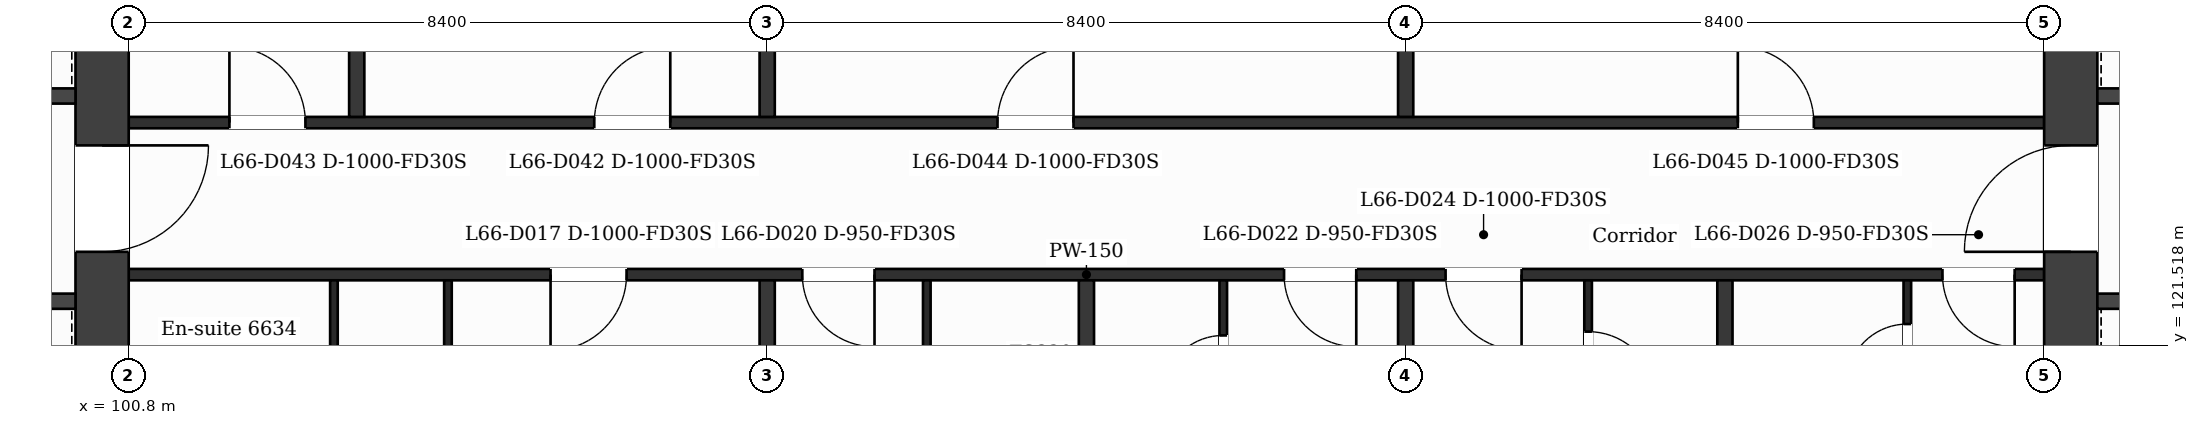
"""IFC4 building model, lengths in metres.
Left out: names, types, materials, properties, quantities, classifications, styles, units other than length and angle.
Written with IfcOpenShell. Run it as: python <this file> out.ifc"""

import sys

from ifc_helpers import new_model, si_unit, direction, frame, frame_2d, origin, place, context, subcontext, project, spatial, rectangle, extrude, element, fill, save


model = new_model("IFC4")
c1 = context("Model", 3, precision=1e-05, world=origin(), true_north=direction((0.0, 1.0)))
c2 = subcontext(c1, "Body", "Model", "MODEL_VIEW")
j1 = project(units=[si_unit("LENGTHUNIT", "METRE"), si_unit("PLANEANGLEUNIT", "RADIAN")], contexts=[c1])
p1 = place(None, origin())
s1 = spatial("IfcSite", under=j1, at=p1, CompositionType="ELEMENT")
p2 = place(p1, origin())
s2 = spatial("IfcBuilding", under=s1, at=p2, CompositionType="ELEMENT")
p3 = place(p2, frame((0.0, 0.0, 273.8)))
s3 = spatial("IfcBuildingStorey", under=s2, at=p3, CompositionType="ELEMENT", Elevation=273.8)
p4 = place(p3, frame((100.45, 132.05, 0.0), z_axis=(0.0, 0.0, 1.0), x_axis=(0.0, -1.0, 0.0)))
e1 = element("IfcWall", 1, at=p4, inside=s3, PredefinedType="SHEAR", context=c2, shape_type="SweptSolid", body=[
    extrude(rectangle(XDim=21.3, YDim=0.7, at=frame_2d((10.65, 0.0))), origin(), (0.0, 0.0, 1.0), 3.7),
])
p5 = place(p4, frame((7.9, 0.0, 0.0)))
e2 = element("IfcOpeningElement", 2, at=p5, cuts=e1, PredefinedType="OPENING", context=c2, shape_type="SweptSolid", body=[
    extrude(rectangle(XDim=1.4, YDim=2.1, at=frame_2d((0.7, 1.05))), frame((0.0, 0.36, 0.0), z_axis=(0.0, -1.0, 0.0), x_axis=(1.0, 0.0, 0.0)), (0.0, 0.0, 1.0), 0.72),
])
p6 = place(p3, frame((126.35, 110.75, 0.0), z_axis=(0.0, 0.0, 1.0), x_axis=(0.0, 1.0, 0.0)))
e3 = element("IfcWall", 3, at=p6, inside=s3, PredefinedType="SHEAR", context=c2, shape_type="SweptSolid", body=[
    extrude(rectangle(XDim=21.3, YDim=0.7, at=frame_2d((10.65, 0.0))), origin(), (0.0, 0.0, 1.0), 3.7),
])
p7 = place(p6, frame((12.0, 0.0, 0.0)))
e4 = element("IfcOpeningElement", 4, at=p7, cuts=e3, PredefinedType="OPENING", context=c2, shape_type="SweptSolid", body=[
    extrude(rectangle(XDim=1.4, YDim=2.1, at=frame_2d((0.7, 1.05))), frame((0.0, 0.36, 0.0), z_axis=(0.0, -1.0, 0.0), x_axis=(1.0, 0.0, 0.0)), (0.0, 0.0, 1.0), 0.72),
])
p8 = place(p3, frame((95.227, 122.1, 0.0), z_axis=(0.0, 0.0, 1.0), x_axis=(1.0, 0.0, 0.0)))
e5 = element("IfcWall", 5, at=p8, inside=s3, PredefinedType="PARTITIONING", context=c2, shape_type="SweptSolid", body=[
    extrude(rectangle(XDim=4.873, YDim=0.2, at=frame_2d((2.437, 0.0))), origin(), (0.0, 0.0, 1.0), 3.38),
])
p9 = place(p8, frame((0.605, 0.0, 0.0)))
e6 = element("IfcOpeningElement", 6, at=p9, cuts=e5, PredefinedType="OPENING", context=c2, shape_type="SweptSolid", body=[
    extrude(rectangle(XDim=1.1, YDim=2.1, at=frame_2d((0.55, 1.05))), frame((0.0, 0.11, 0.0), z_axis=(0.0, -1.0, 0.0), x_axis=(1.0, 0.0, 0.0)), (0.0, 0.0, 1.0), 0.22),
])
p10 = place(p8, frame((2.946, 0.0, 0.0)))
e7 = element("IfcOpeningElement", 7, at=p10, cuts=e5, PredefinedType="OPENING", context=c2, shape_type="SweptSolid", body=[
    extrude(rectangle(XDim=1.1, YDim=2.1, at=frame_2d((0.55, 1.05))), frame((0.0, 0.11, 0.0), z_axis=(0.0, -1.0, 0.0), x_axis=(1.0, 0.0, 0.0)), (0.0, 0.0, 1.0), 0.22),
])
p11 = place(p3, frame((126.7, 122.1, 0.0), z_axis=(0.0, 0.0, 1.0), x_axis=(1.0, 0.0, 0.0)))
e8 = element("IfcWall", 8, at=p11, inside=s3, PredefinedType="PARTITIONING", context=c2, shape_type="SweptSolid", body=[
    extrude(rectangle(XDim=4.873, YDim=0.2, at=frame_2d((2.437, 0.0))), origin(), (0.0, 0.0, 1.0), 3.38),
])
p12 = place(p11, frame((3.105, 0.0, 0.0)))
e9 = element("IfcOpeningElement", 9, at=p12, cuts=e8, PredefinedType="OPENING", context=c2, shape_type="SweptSolid", body=[
    extrude(rectangle(XDim=1.1, YDim=2.1, at=frame_2d((0.55, 1.05))), frame((0.0, 0.11, 0.0), z_axis=(0.0, -1.0, 0.0), x_axis=(1.0, 0.0, 0.0)), (0.0, 0.0, 1.0), 0.22),
])
p13 = place(p11, frame((0.668, 0.0, 0.0)))
e10 = element("IfcOpeningElement", 10, at=p13, cuts=e8, PredefinedType="OPENING", context=c2, shape_type="SweptSolid", body=[
    extrude(rectangle(XDim=1.1, YDim=2.1, at=frame_2d((0.55, 1.05))), frame((0.0, 0.11, 0.0), z_axis=(0.0, -1.0, 0.0), x_axis=(1.0, 0.0, 0.0)), (0.0, 0.0, 1.0), 0.22),
])
p14 = place(p3, frame((100.8, 122.45, 0.0), z_axis=(0.0, 0.0, 1.0), x_axis=(1.0, 0.0, 0.0)))
e11 = element("IfcWall", 11, at=p14, inside=s3, PredefinedType="PARTITIONING", context=c2, shape_type="SweptSolid", body=[
    extrude(rectangle(XDim=25.2, YDim=0.15, at=frame_2d((12.6, 0.0))), origin(), (0.0, 0.0, 1.0), 3.38),
])
p15 = place(p14, frame((5.55, 0.0, 0.0)))
e12 = element("IfcOpeningElement", 12, at=p15, cuts=e11, PredefinedType="OPENING", context=c2, shape_type="SweptSolid", body=[
    extrude(rectangle(XDim=1.0, YDim=2.1, at=frame_2d((0.5, 1.05))), frame((0.0, 0.085, 0.0), z_axis=(0.0, -1.0, 0.0), x_axis=(1.0, 0.0, 0.0)), (0.0, 0.0, 1.0), 0.17),
])
p16 = place(p14, frame((8.862, 0.0, 0.0)))
e13 = element("IfcOpeningElement", 13, at=p16, cuts=e11, PredefinedType="OPENING", context=c2, shape_type="SweptSolid", body=[
    extrude(rectangle(XDim=0.95, YDim=2.1, at=frame_2d((0.475, 1.05))), frame((0.0, 0.085, 0.0), z_axis=(0.0, -1.0, 0.0), x_axis=(1.0, 0.0, 0.0)), (0.0, 0.0, 1.0), 0.17),
])
p17 = place(p14, frame((15.2, 0.0, 0.0)))
e14 = element("IfcOpeningElement", 14, at=p17, cuts=e11, PredefinedType="OPENING", context=c2, shape_type="SweptSolid", body=[
    extrude(rectangle(XDim=0.95, YDim=2.1, at=frame_2d((0.475, 1.05))), frame((0.0, 0.085, 0.0), z_axis=(0.0, -1.0, 0.0), x_axis=(1.0, 0.0, 0.0)), (0.0, 0.0, 1.0), 0.17),
])
p18 = place(p14, frame((17.325, 0.0, 0.0)))
e15 = element("IfcOpeningElement", 15, at=p18, cuts=e11, PredefinedType="OPENING", context=c2, shape_type="SweptSolid", body=[
    extrude(rectangle(XDim=1.0, YDim=2.1, at=frame_2d((0.5, 1.05))), frame((0.0, 0.085, 0.0), z_axis=(0.0, -1.0, 0.0), x_axis=(1.0, 0.0, 0.0)), (0.0, 0.0, 1.0), 0.17),
])
p19 = place(p14, frame((23.862, 0.0, 0.0)))
e16 = element("IfcOpeningElement", 16, at=p19, cuts=e11, PredefinedType="OPENING", context=c2, shape_type="SweptSolid", body=[
    extrude(rectangle(XDim=0.95, YDim=2.1, at=frame_2d((0.475, 1.05))), frame((0.0, 0.085, 0.0), z_axis=(0.0, -1.0, 0.0), x_axis=(1.0, 0.0, 0.0)), (0.0, 0.0, 1.0), 0.17),
])
p20 = place(p3, frame((100.8, 124.45, 0.0), z_axis=(0.0, 0.0, 1.0), x_axis=(1.0, 0.0, 0.0)))
e17 = element("IfcWall", 17, at=p20, inside=s3, PredefinedType="PARTITIONING", context=c2, shape_type="SweptSolid", body=[
    extrude(rectangle(XDim=25.2, YDim=0.15, at=frame_2d((12.6, 0.0))), origin(), (0.0, 0.0, 1.0), 3.38),
])
p21 = place(p20, frame((6.125, 0.0, 0.0)))
e18 = element("IfcOpeningElement", 18, at=p21, cuts=e17, PredefinedType="OPENING", context=c2, shape_type="SweptSolid", body=[
    extrude(rectangle(XDim=1.0, YDim=2.1, at=frame_2d((0.5, 1.05))), frame((0.0, 0.085, 0.0), z_axis=(0.0, -1.0, 0.0), x_axis=(1.0, 0.0, 0.0)), (0.0, 0.0, 1.0), 0.17),
])
p22 = place(p20, frame((1.325, 0.0, 0.0)))
e19 = element("IfcOpeningElement", 19, at=p22, cuts=e17, PredefinedType="OPENING", context=c2, shape_type="SweptSolid", body=[
    extrude(rectangle(XDim=1.0, YDim=2.1, at=frame_2d((0.5, 1.05))), frame((0.0, 0.085, 0.0), z_axis=(0.0, -1.0, 0.0), x_axis=(1.0, 0.0, 0.0)), (0.0, 0.0, 1.0), 0.17),
])
p23 = place(p20, frame((11.43, 0.0, 0.0)))
e20 = element("IfcOpeningElement", 20, at=p23, cuts=e17, PredefinedType="OPENING", context=c2, shape_type="SweptSolid", body=[
    extrude(rectangle(XDim=1.0, YDim=2.1, at=frame_2d((0.5, 1.05))), frame((0.0, 0.085, 0.0), z_axis=(0.0, -1.0, 0.0), x_axis=(1.0, 0.0, 0.0)), (0.0, 0.0, 1.0), 0.17),
])
p24 = place(p20, frame((21.17, 0.0, 0.0)))
e21 = element("IfcOpeningElement", 21, at=p24, cuts=e17, PredefinedType="OPENING", context=c2, shape_type="SweptSolid", body=[
    extrude(rectangle(XDim=1.0, YDim=2.1, at=frame_2d((0.5, 1.05))), frame((0.0, 0.085, 0.0), z_axis=(0.0, -1.0, 0.0), x_axis=(1.0, 0.0, 0.0)), (0.0, 0.0, 1.0), 0.17),
])
p25 = place(p3, frame((92.702, 124.8, 0.0), z_axis=(0.0, 0.0, 1.0), x_axis=(1.0, 0.0, 0.0)))
e22 = element("IfcWall", 22, at=p25, inside=s3, PredefinedType="PARTITIONING", context=c2, shape_type="SweptSolid", body=[
    extrude(rectangle(XDim=7.398, YDim=0.2, at=frame_2d((3.699, 0.0))), origin(), (0.0, 0.0, 1.0), 3.38),
])
p26 = place(p25, frame((5.636, 0.0, 0.0)))
e23 = element("IfcOpeningElement", 23, at=p26, cuts=e22, PredefinedType="OPENING", context=c2, shape_type="SweptSolid", body=[
    extrude(rectangle(XDim=1.1, YDim=2.1, at=frame_2d((0.55, 1.05))), frame((0.0, 0.11, 0.0), z_axis=(0.0, -1.0, 0.0), x_axis=(1.0, 0.0, 0.0)), (0.0, 0.0, 1.0), 0.22),
])
p27 = place(p3, frame((126.7, 124.8, 0.0), z_axis=(0.0, 0.0, 1.0), x_axis=(1.0, 0.0, 0.0)))
e24 = element("IfcWall", 24, at=p27, inside=s3, PredefinedType="PARTITIONING", context=c2, shape_type="SweptSolid", body=[
    extrude(rectangle(XDim=4.849, YDim=0.2, at=frame_2d((2.424, 0.0))), origin(), (0.0, 0.0, 1.0), 3.38),
])
p28 = place(p27, frame((0.818, 0.0, 0.0)))
e25 = element("IfcOpeningElement", 25, at=p28, cuts=e24, PredefinedType="OPENING", context=c2, shape_type="SweptSolid", body=[
    extrude(rectangle(XDim=1.1, YDim=2.1, at=frame_2d((0.55, 1.05))), frame((0.0, 0.11, 0.0), z_axis=(0.0, -1.0, 0.0), x_axis=(1.0, 0.0, 0.0)), (0.0, 0.0, 1.0), 0.22),
])
p29 = place(p3, frame((103.5, 120.4, 0.0), z_axis=(0.0, 0.0, 1.0), x_axis=(0.0, 1.0, 0.0)))
e26 = element("IfcWall", 26, at=p29, inside=s3, PredefinedType="PARTITIONING", context=c2, shape_type="SweptSolid", body=[
    extrude(rectangle(XDim=1.975, YDim=0.1, at=frame_2d((0.988, 0.0))), origin(), (0.0, 0.0, 1.0), 3.38),
])
p30 = place(p3, frame((103.8, 124.525, 0.0), z_axis=(0.0, 0.0, 1.0), x_axis=(0.0, 1.0, 0.0)))
e27 = element("IfcWall", 27, at=p30, inside=s3, PredefinedType="PARTITIONING", context=c2, shape_type="SweptSolid", body=[
    extrude(rectangle(XDim=5.825, YDim=0.2, at=frame_2d((2.913, 0.0))), origin(), (0.0, 0.0, 1.0), 3.38),
])
p31 = place(p3, frame((105.0, 110.55, 0.0), z_axis=(0.0, 0.0, 1.0), x_axis=(0.0, 1.0, 0.0)))
e28 = element("IfcWall", 28, at=p31, inside=s3, PredefinedType="PARTITIONING", context=c2, shape_type="SweptSolid", body=[
    extrude(rectangle(XDim=11.825, YDim=0.1, at=frame_2d((5.913, 0.0))), origin(), (0.0, 0.0, 1.0), 3.38),
])
p32 = place(p31, frame((9.09, 0.0, 0.0)))
e29 = element("IfcOpeningElement", 29, at=p32, cuts=e28, PredefinedType="OPENING", context=c2, shape_type="SweptSolid", body=[
    extrude(rectangle(XDim=0.9, YDim=2.1, at=frame_2d((0.45, 1.05))), frame((0.0, 0.06, 0.0), z_axis=(0.0, -1.0, 0.0), x_axis=(1.0, 0.0, 0.0)), (0.0, 0.0, 1.0), 0.12),
])
p33 = place(p3, frame((109.2, 110.55, 0.0), z_axis=(0.0, 0.0, 1.0), x_axis=(0.0, 1.0, 0.0)))
e30 = element("IfcWall", 30, at=p33, inside=s3, PredefinedType="PARTITIONING", context=c2, shape_type="SweptSolid", body=[
    extrude(rectangle(XDim=11.825, YDim=0.2, at=frame_2d((5.913, 0.0))), origin(), (0.0, 0.0, 1.0), 3.38),
])
p34 = place(p3, frame((109.2, 124.525, 0.0), z_axis=(0.0, 0.0, 1.0), x_axis=(0.0, 1.0, 0.0)))
e31 = element("IfcWall", 31, at=p34, inside=s3, PredefinedType="PARTITIONING", context=c2, shape_type="SweptSolid", body=[
    extrude(rectangle(XDim=9.2, YDim=0.2, at=frame_2d((4.6, 0.0))), origin(), (0.0, 0.0, 1.0), 3.38),
])
p35 = place(p3, frame((111.3, 119.8, 0.0), z_axis=(0.0, 0.0, 1.0), x_axis=(0.0, 1.0, 0.0)))
e32 = element("IfcWall", 32, at=p35, inside=s3, PredefinedType="PARTITIONING", context=c2, shape_type="SweptSolid", body=[
    extrude(rectangle(XDim=2.575, YDim=0.1, at=frame_2d((1.288, 0.0))), origin(), (0.0, 0.0, 1.0), 3.38),
])
p36 = place(p35, frame((0.6, 0.0, 0.0)))
e33 = element("IfcOpeningElement", 33, at=p36, cuts=e32, PredefinedType="OPENING", context=c2, shape_type="SweptSolid", body=[
    extrude(rectangle(XDim=0.8, YDim=2.1, at=frame_2d((0.4, 1.05))), frame((0.0, 0.06, 0.0), z_axis=(0.0, -1.0, 0.0), x_axis=(1.0, 0.0, 0.0)), (0.0, 0.0, 1.0), 0.12),
])
p37 = place(p3, frame((113.4, 110.55, 0.0), z_axis=(0.0, 0.0, 1.0), x_axis=(0.0, 1.0, 0.0)))
e34 = element("IfcWall", 34, at=p37, inside=s3, PredefinedType="PARTITIONING", context=c2, shape_type="SweptSolid", body=[
    extrude(rectangle(XDim=11.825, YDim=0.2, at=frame_2d((5.913, 0.0))), origin(), (0.0, 0.0, 1.0), 3.38),
])
p38 = place(p3, frame((115.2, 120.1, 0.0), z_axis=(0.0, 0.0, 1.0), x_axis=(0.0, 1.0, 0.0)))
e35 = element("IfcWall", 35, at=p38, inside=s3, PredefinedType="PARTITIONING", context=c2, shape_type="SweptSolid", body=[
    extrude(rectangle(XDim=2.275, YDim=0.1, at=frame_2d((1.137, 0.0))), origin(), (0.0, 0.0, 1.0), 3.38),
])
p39 = place(p38, frame((0.75, 0.0, 0.0)))
e36 = element("IfcOpeningElement", 36, at=p39, cuts=e35, PredefinedType="OPENING", context=c2, shape_type="SweptSolid", body=[
    extrude(rectangle(XDim=0.8, YDim=2.1, at=frame_2d((0.4, 1.05))), frame((0.0, 0.06, 0.0), z_axis=(0.0, -1.0, 0.0), x_axis=(1.0, 0.0, 0.0)), (0.0, 0.0, 1.0), 0.12),
])
p40 = place(p3, frame((117.6, 110.55, 0.0), z_axis=(0.0, 0.0, 1.0), x_axis=(0.0, 1.0, 0.0)))
e37 = element("IfcWall", 37, at=p40, inside=s3, PredefinedType="PARTITIONING", context=c2, shape_type="SweptSolid", body=[
    extrude(rectangle(XDim=11.825, YDim=0.2, at=frame_2d((5.913, 0.0))), origin(), (0.0, 0.0, 1.0), 3.38),
])
p41 = place(p3, frame((117.6, 124.525, 0.0), z_axis=(0.0, 0.0, 1.0), x_axis=(0.0, 1.0, 0.0)))
e38 = element("IfcWall", 38, at=p41, inside=s3, PredefinedType="PARTITIONING", context=c2, shape_type="SweptSolid", body=[
    extrude(rectangle(XDim=9.2, YDim=0.2, at=frame_2d((4.6, 0.0))), origin(), (0.0, 0.0, 1.0), 3.38),
])
p42 = place(p3, frame((120.0, 120.1, 0.0), z_axis=(0.0, 0.0, 1.0), x_axis=(0.0, 1.0, 0.0)))
e39 = element("IfcWall", 39, at=p42, inside=s3, PredefinedType="PARTITIONING", context=c2, shape_type="SweptSolid", body=[
    extrude(rectangle(XDim=2.275, YDim=0.1, at=frame_2d((1.137, 0.0))), origin(), (0.0, 0.0, 1.0), 3.38),
])
p43 = place(p42, frame((0.7, 0.0, 0.0)))
e40 = element("IfcOpeningElement", 40, at=p43, cuts=e39, PredefinedType="OPENING", context=c2, shape_type="SweptSolid", body=[
    extrude(rectangle(XDim=0.9, YDim=2.1, at=frame_2d((0.45, 1.05))), frame((0.0, 0.06, 0.0), z_axis=(0.0, -1.0, 0.0), x_axis=(1.0, 0.0, 0.0)), (0.0, 0.0, 1.0), 0.12),
])
p44 = place(p3, frame((121.8, 110.55, 0.0), z_axis=(0.0, 0.0, 1.0), x_axis=(0.0, 1.0, 0.0)))
e41 = element("IfcWall", 41, at=p44, inside=s3, PredefinedType="PARTITIONING", context=c2, shape_type="SweptSolid", body=[
    extrude(rectangle(XDim=11.825, YDim=0.2, at=frame_2d((5.913, 0.0))), origin(), (0.0, 0.0, 1.0), 3.38),
])
p45 = place(p3, frame((124.2, 119.8, 0.0), z_axis=(0.0, 0.0, 1.0), x_axis=(0.0, 1.0, 0.0)))
e42 = element("IfcWall", 42, at=p45, inside=s3, PredefinedType="PARTITIONING", context=c2, shape_type="SweptSolid", body=[
    extrude(rectangle(XDim=2.575, YDim=0.1, at=frame_2d((1.288, 0.0))), origin(), (0.0, 0.0, 1.0), 3.38),
])
p46 = place(p45, frame((1.2, 0.0, 0.0)))
e43 = element("IfcOpeningElement", 43, at=p46, cuts=e42, PredefinedType="OPENING", context=c2, shape_type="SweptSolid", body=[
    extrude(rectangle(XDim=0.8, YDim=2.1, at=frame_2d((0.4, 1.05))), frame((0.0, 0.06, 0.0), z_axis=(0.0, -1.0, 0.0), x_axis=(1.0, 0.0, 0.0)), (0.0, 0.0, 1.0), 0.12),
])
p47 = place(p15, origin())
e44 = element("IfcDoor", 44, at=p47, inside=s3, OperationType="SINGLE_SWING_LEFT", PredefinedType="DOOR", context=c2, shape_type="SweptSolid", body=[
    extrude(rectangle(XDim=1.0, YDim=2.1, at=frame_2d((0.5, 1.05))), frame((0.0, 0.025, 0.0), z_axis=(0.0, -1.0, 0.0), x_axis=(1.0, 0.0, 0.0)), (0.0, 0.0, 1.0), 0.05),
])
fill(e12, e44)
p48 = place(p16, origin())
e45 = element("IfcDoor", 45, at=p48, inside=s3, OperationType="SINGLE_SWING_RIGHT", PredefinedType="DOOR", context=c2, shape_type="SweptSolid", body=[
    extrude(rectangle(XDim=0.95, YDim=2.1, at=frame_2d((0.475, 1.05))), frame((0.0, 0.025, 0.0), z_axis=(0.0, -1.0, 0.0), x_axis=(1.0, 0.0, 0.0)), (0.0, 0.0, 1.0), 0.05),
])
fill(e13, e45)
p49 = place(p17, origin())
e46 = element("IfcDoor", 46, at=p49, inside=s3, OperationType="SINGLE_SWING_RIGHT", PredefinedType="DOOR", context=c2, shape_type="SweptSolid", body=[
    extrude(rectangle(XDim=0.95, YDim=2.1, at=frame_2d((0.475, 1.05))), frame((0.0, 0.025, 0.0), z_axis=(0.0, -1.0, 0.0), x_axis=(1.0, 0.0, 0.0)), (0.0, 0.0, 1.0), 0.05),
])
fill(e14, e46)
p50 = place(p39, origin())
e47 = element("IfcDoor", 47, at=p50, inside=s3, OperationType="SINGLE_SWING_LEFT", PredefinedType="DOOR", context=c2, shape_type="SweptSolid", body=[
    extrude(rectangle(XDim=0.8, YDim=2.1, at=frame_2d((0.4, 1.05))), frame((0.0, 0.025, 0.0), z_axis=(0.0, -1.0, 0.0), x_axis=(1.0, 0.0, 0.0)), (0.0, 0.0, 1.0), 0.05),
])
fill(e36, e47)
p51 = place(p18, origin())
e48 = element("IfcDoor", 48, at=p51, inside=s3, OperationType="SINGLE_SWING_RIGHT", PredefinedType="DOOR", context=c2, shape_type="SweptSolid", body=[
    extrude(rectangle(XDim=1.0, YDim=2.1, at=frame_2d((0.5, 1.05))), frame((0.0, 0.025, 0.0), z_axis=(0.0, -1.0, 0.0), x_axis=(1.0, 0.0, 0.0)), (0.0, 0.0, 1.0), 0.05),
])
fill(e15, e48)
p52 = place(p43, origin())
e49 = element("IfcDoor", 49, at=p52, inside=s3, OperationType="SINGLE_SWING_LEFT", PredefinedType="DOOR", context=c2, shape_type="SweptSolid", body=[
    extrude(rectangle(XDim=0.9, YDim=2.1, at=frame_2d((0.45, 1.05))), frame((0.0, 0.025, 0.0), z_axis=(0.0, -1.0, 0.0), x_axis=(1.0, 0.0, 0.0)), (0.0, 0.0, 1.0), 0.05),
])
fill(e40, e49)
p53 = place(p19, origin())
e50 = element("IfcDoor", 50, at=p53, inside=s3, OperationType="SINGLE_SWING_RIGHT", PredefinedType="DOOR", context=c2, shape_type="SweptSolid", body=[
    extrude(rectangle(XDim=0.95, YDim=2.1, at=frame_2d((0.475, 1.05))), frame((0.0, 0.025, 0.0), z_axis=(0.0, -1.0, 0.0), x_axis=(1.0, 0.0, 0.0)), (0.0, 0.0, 1.0), 0.05),
])
fill(e16, e50)
p54 = place(p46, origin())
e51 = element("IfcDoor", 51, at=p54, inside=s3, OperationType="SINGLE_SWING_LEFT", PredefinedType="DOOR", context=c2, shape_type="SweptSolid", body=[
    extrude(rectangle(XDim=0.8, YDim=2.1, at=frame_2d((0.4, 1.05))), frame((0.0, 0.025, 0.0), z_axis=(0.0, -1.0, 0.0), x_axis=(1.0, 0.0, 0.0)), (0.0, 0.0, 1.0), 0.05),
])
fill(e43, e51)
p55 = place(p21, origin())
e52 = element("IfcDoor", 52, at=p55, inside=s3, OperationType="SINGLE_SWING_RIGHT", PredefinedType="DOOR", context=c2, shape_type="SweptSolid", body=[
    extrude(rectangle(XDim=1.0, YDim=2.1, at=frame_2d((0.5, 1.05))), frame((0.0, 0.025, 0.0), z_axis=(0.0, -1.0, 0.0), x_axis=(1.0, 0.0, 0.0)), (0.0, 0.0, 1.0), 0.05),
])
fill(e18, e52)
p56 = place(p22, origin())
e53 = element("IfcDoor", 53, at=p56, inside=s3, OperationType="SINGLE_SWING_LEFT", PredefinedType="DOOR", context=c2, shape_type="SweptSolid", body=[
    extrude(rectangle(XDim=1.0, YDim=2.1, at=frame_2d((0.5, 1.05))), frame((0.0, 0.025, 0.0), z_axis=(0.0, -1.0, 0.0), x_axis=(1.0, 0.0, 0.0)), (0.0, 0.0, 1.0), 0.05),
])
fill(e19, e53)
p57 = place(p23, origin())
e54 = element("IfcDoor", 54, at=p57, inside=s3, OperationType="SINGLE_SWING_RIGHT", PredefinedType="DOOR", context=c2, shape_type="SweptSolid", body=[
    extrude(rectangle(XDim=1.0, YDim=2.1, at=frame_2d((0.5, 1.05))), frame((0.0, 0.025, 0.0), z_axis=(0.0, -1.0, 0.0), x_axis=(1.0, 0.0, 0.0)), (0.0, 0.0, 1.0), 0.05),
])
fill(e20, e54)
p58 = place(p24, origin())
e55 = element("IfcDoor", 55, at=p58, inside=s3, OperationType="SINGLE_SWING_LEFT", PredefinedType="DOOR", context=c2, shape_type="SweptSolid", body=[
    extrude(rectangle(XDim=1.0, YDim=2.1, at=frame_2d((0.5, 1.05))), frame((0.0, 0.025, 0.0), z_axis=(0.0, -1.0, 0.0), x_axis=(1.0, 0.0, 0.0)), (0.0, 0.0, 1.0), 0.05),
])
fill(e21, e55)
p59 = place(p5, origin())
e56 = element("IfcDoor", 56, at=p59, inside=s3, OperationType="SINGLE_SWING_LEFT", PredefinedType="DOOR", context=c2, shape_type="SweptSolid", body=[
    extrude(rectangle(XDim=1.4, YDim=2.1, at=frame_2d((0.7, 1.05))), frame((0.0, 0.025, 0.0), z_axis=(0.0, -1.0, 0.0), x_axis=(1.0, 0.0, 0.0)), (0.0, 0.0, 1.0), 0.05),
])
fill(e2, e56)
p60 = place(p7, origin())
e57 = element("IfcDoor", 57, at=p60, inside=s3, OperationType="SINGLE_SWING_LEFT", PredefinedType="DOOR", context=c2, shape_type="SweptSolid", body=[
    extrude(rectangle(XDim=1.4, YDim=2.1, at=frame_2d((0.7, 1.05))), frame((0.0, 0.025, 0.0), z_axis=(0.0, -1.0, 0.0), x_axis=(1.0, 0.0, 0.0)), (0.0, 0.0, 1.0), 0.05),
])
fill(e4, e57)
save(model, sys.argv[1])
